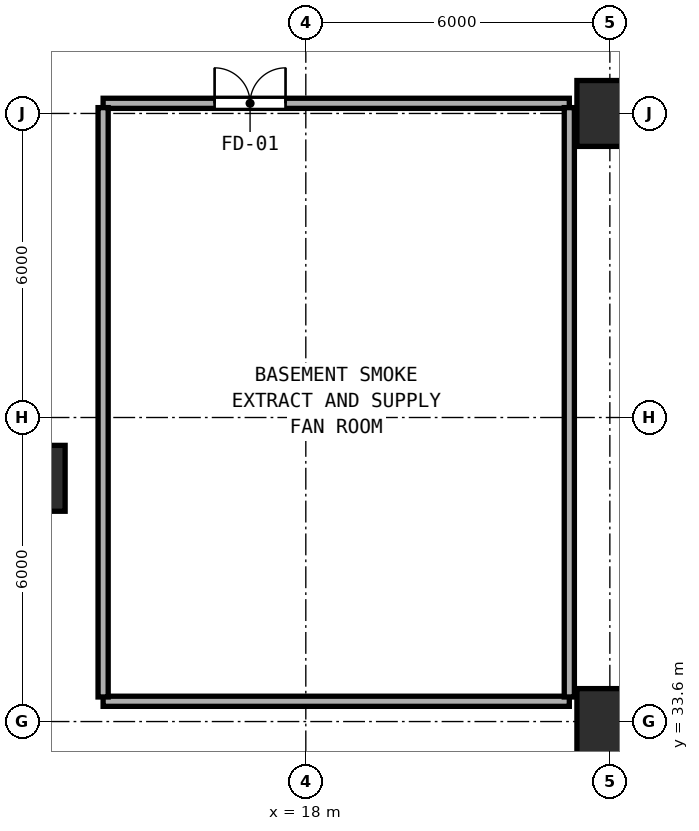
"""IFC4 building model, lengths in metres.
Left out: names, types, materials, properties, quantities, classifications, styles, units other than length and angle.
Written with IfcOpenShell. Run it as: python <this file> out.ifc"""

import sys

from ifc_helpers import new_model, si_unit, direction, frame, frame_2d, origin, origin_2d, place, context, subcontext, project, spatial, rectangle, hollow_rectangle, extrude, element, fill, save


model = new_model("IFC4")
c1 = context("Model", 3, precision=1e-05, world=origin(), true_north=direction((0.0, 1.0)))
c2 = subcontext(c1, "Body", "Model", "MODEL_VIEW")
j1 = project(units=[si_unit("LENGTHUNIT", "METRE"), si_unit("PLANEANGLEUNIT", "RADIAN")], contexts=[c1])
p1 = place(None, origin())
s1 = spatial("IfcSite", under=j1, at=p1, CompositionType="ELEMENT")
p2 = place(p1, origin())
s2 = spatial("IfcBuilding", under=s1, at=p2, CompositionType="ELEMENT")
p3 = place(p2, frame((0.0, 0.0, -9.6)))
s3 = spatial("IfcBuildingStorey", under=s2, at=p3, CompositionType="ELEMENT", Elevation=-9.6)
for number, where, z_axis, x_axis in (
    (1, (24.0, 33.6, 0.0), (0.0, 0.0, 1.0), (1.0, 0.0, 0.0)),
    (2, (24.0, 45.6, 0.0), (0.0, 0.0, 1.0), (1.0, 0.0, 0.0)),
    (3, (12.6, 38.4, 0.0), (0.0, 0.0, 1.0), (1.0, 0.0, 0.0)),
):
    element("IfcColumn", number, at=place(p3, frame(where, z_axis=z_axis, x_axis=x_axis)), inside=s3, PredefinedType="COLUMN", context=c2, shape_type="SweptSolid", body=[
        extrude(hollow_rectangle(XDim=1.3, YDim=1.3, WallThickness=0.048, at=origin_2d()), origin(), (0.0, 0.0, 1.0), 4.8),
    ])
p4 = place(p3, frame((14.0, 45.8, 0.0), z_axis=(0.0, 0.0, 1.0), x_axis=(1.0, 0.0, 0.0)))
e4 = element("IfcWall", 4, at=p4, inside=s3, PredefinedType="SOLIDWALL", context=c2, shape_type="SweptSolid", body=[
    extrude(rectangle(XDim=9.2, YDim=0.2, at=frame_2d((4.6, 0.0))), origin(), (0.0, 0.0, 1.0), 4.52),
])
p5 = place(p4, frame((2.2, 0.0, 0.0)))
e5 = element("IfcOpeningElement", 5, at=p5, cuts=e4, PredefinedType="OPENING", context=c2, shape_type="SweptSolid", body=[
    extrude(rectangle(XDim=1.4, YDim=2.2, at=frame_2d((0.7, 1.1))), frame((0.0, 0.11, 0.0), z_axis=(0.0, -1.0, 0.0), x_axis=(1.0, 0.0, 0.0)), (0.0, 0.0, 1.0), 0.22),
])
p6 = place(p3, frame((14.0, 34.0, 0.0), z_axis=(0.0, 0.0, 1.0), x_axis=(1.0, 0.0, 0.0)))
e6 = element("IfcWall", 6, at=p6, inside=s3, PredefinedType="SOLIDWALL", context=c2, shape_type="SweptSolid", body=[
    extrude(rectangle(XDim=9.2, YDim=0.2, at=frame_2d((4.6, 0.0))), origin(), (0.0, 0.0, 1.0), 4.52),
])
for number, where, z_axis, x_axis in (
    (7, (14.0, 34.085, 0.0), (0.0, 0.0, 1.0), (0.0, 1.0, 0.0)),
    (8, (23.2, 34.085, 0.0), (0.0, 0.0, 1.0), (0.0, 1.0, 0.0)),
):
    element("IfcWall", number, at=place(p3, frame(where, z_axis=z_axis, x_axis=x_axis)), inside=s3, PredefinedType="SOLIDWALL", context=c2, shape_type="SweptSolid", body=[
        extrude(rectangle(XDim=11.63, YDim=0.2, at=frame_2d((5.815, 0.0))), origin(), (0.0, 0.0, 1.0), 4.52),
    ])
p7 = place(p5, origin())
e9 = element("IfcDoor", 9, at=p7, inside=s3, OperationType="DOUBLE_DOOR_SINGLE_SWING", PredefinedType="DOOR", context=c2, shape_type="SweptSolid", body=[
    extrude(rectangle(XDim=1.4, YDim=2.2, at=frame_2d((0.7, 1.1))), frame((0.0, 0.025, 0.0), z_axis=(0.0, -1.0, 0.0), x_axis=(1.0, 0.0, 0.0)), (0.0, 0.0, 1.0), 0.05),
])
fill(e5, e9)
save(model, sys.argv[1])
